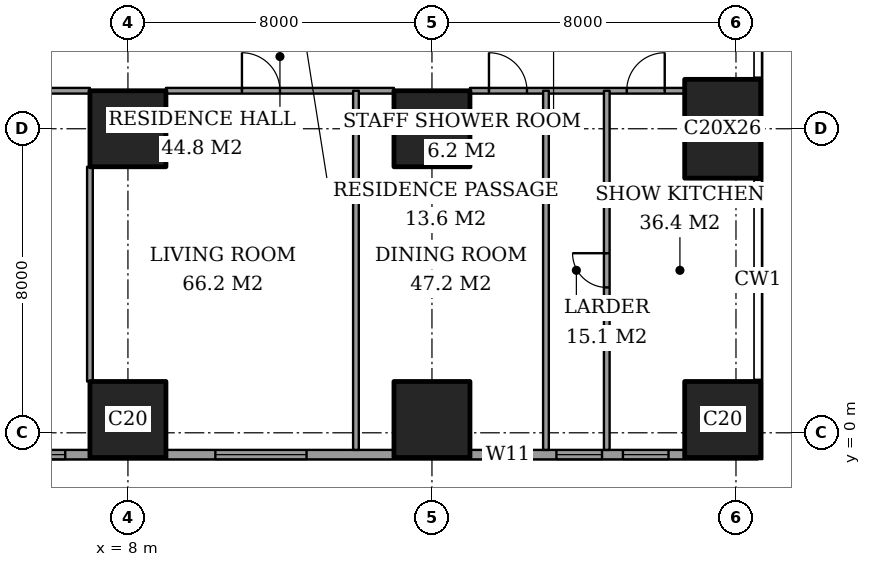
"""IFC4 building model, lengths in metres.
Left out: names, types, materials, properties, quantities, classifications, styles, units other than length and angle.
Written with IfcOpenShell. Run it as: python <this file> out.ifc"""

import sys

from ifc_helpers import new_model, si_unit, direction, frame, frame_2d, origin, origin_2d, place, context, subcontext, project, spatial, rectangle, extrude, element, fill, save


model = new_model("IFC4")
c1 = context("Model", 3, precision=1e-05, world=origin(), true_north=direction((0.0, 1.0)))
c2 = subcontext(c1, "Body", "Model", "MODEL_VIEW")
j1 = project(units=[si_unit("LENGTHUNIT", "METRE"), si_unit("PLANEANGLEUNIT", "RADIAN")], contexts=[c1])
p1 = place(None, origin())
s1 = spatial("IfcSite", under=j1, at=p1, CompositionType="ELEMENT")
p2 = place(p1, origin())
s2 = spatial("IfcBuilding", under=s1, at=p2, CompositionType="ELEMENT")
p3 = place(p2, frame((0.0, 0.0, 103.4)))
s3 = spatial("IfcBuildingStorey", under=s2, at=p3, CompositionType="ELEMENT", Elevation=103.4)
for number, where, z_axis, x_axis in (
    (1, (8.0, 0.35, 0.0), (0.0, 0.0, 1.0), (1.0, 0.0, 0.0)),
    (2, (8.0, 8.0, 0.0), (0.0, 0.0, 1.0), (1.0, 0.0, 0.0)),
    (3, (16.0, 0.35, 0.0), (0.0, 0.0, 1.0), (1.0, 0.0, 0.0)),
    (4, (16.0, 8.0, 0.0), (0.0, 0.0, 1.0), (1.0, 0.0, 0.0)),
    (5, (23.65, 0.35, 0.0), (0.0, 0.0, 1.0), (1.0, 0.0, 0.0)),
):
    element("IfcColumn", number, at=place(p3, frame(where, z_axis=z_axis, x_axis=x_axis)), inside=s3, PredefinedType="COLUMN", context=c2, shape_type="SweptSolid", body=[
        extrude(rectangle(XDim=2.0, YDim=2.0, at=origin_2d()), origin(), (0.0, 0.0, 1.0), 3.6),
    ])
p4 = place(p3, frame((23.65, 8.0, 0.0), z_axis=(0.0, 0.0, 1.0), x_axis=(1.0, 0.0, 0.0)))
e6 = element("IfcColumn", 6, at=p4, inside=s3, PredefinedType="COLUMN", context=c2, shape_type="SweptSolid", body=[
    extrude(rectangle(XDim=2.0, YDim=2.6, at=origin_2d()), origin(), (0.0, 0.0, 1.0), 3.6),
])
p5 = place(p3, frame((3.175, -0.575, 0.0), z_axis=(0.0, 0.0, 1.0), x_axis=(1.0, 0.0, 0.0)))
e7 = element("IfcWall", 7, at=p5, inside=s3, PredefinedType="SOLIDWALL", context=c2, shape_type="SweptSolid", body=[
    extrude(rectangle(XDim=21.4, YDim=0.25, at=frame_2d((10.7, 0.0))), origin(), (0.0, 0.0, 1.0), 3.6),
])
p6 = place(p5, frame((0.775, 0.0, 0.4)))
e8 = element("IfcOpeningElement", 8, at=p6, cuts=e7, PredefinedType="OPENING", context=c2, shape_type="SweptSolid", body=[
    extrude(rectangle(XDim=2.4, YDim=2.2, at=frame_2d((1.2, 1.1))), frame((0.0, 0.135, 0.0), z_axis=(0.0, -1.0, 0.0), x_axis=(1.0, 0.0, 0.0)), (0.0, 0.0, 1.0), 0.27),
])
p7 = place(p5, frame((7.125, 0.0, 0.4)))
e9 = element("IfcOpeningElement", 9, at=p7, cuts=e7, PredefinedType="OPENING", context=c2, shape_type="SweptSolid", body=[
    extrude(rectangle(XDim=2.4, YDim=2.2, at=frame_2d((1.2, 1.1))), frame((0.0, 0.135, 0.0), z_axis=(0.0, -1.0, 0.0), x_axis=(1.0, 0.0, 0.0)), (0.0, 0.0, 1.0), 0.27),
])
p8 = place(p5, frame((14.225, 0.0, 0.4)))
e10 = element("IfcOpeningElement", 10, at=p8, cuts=e7, PredefinedType="OPENING", context=c2, shape_type="SweptSolid", body=[
    extrude(rectangle(XDim=1.2, YDim=2.2, at=frame_2d((0.6, 1.1))), frame((0.0, 0.135, 0.0), z_axis=(0.0, -1.0, 0.0), x_axis=(1.0, 0.0, 0.0)), (0.0, 0.0, 1.0), 0.27),
])
p9 = place(p5, frame((16.1, 0.0, 0.4)))
e11 = element("IfcOpeningElement", 11, at=p9, cuts=e7, PredefinedType="OPENING", context=c2, shape_type="SweptSolid", body=[
    extrude(rectangle(XDim=1.2, YDim=2.2, at=frame_2d((0.6, 1.1))), frame((0.0, 0.135, 0.0), z_axis=(0.0, -1.0, 0.0), x_axis=(1.0, 0.0, 0.0)), (0.0, 0.0, 1.0), 0.27),
])
p10 = place(p5, frame((17.85, 0.0, 0.4)))
e12 = element("IfcOpeningElement", 12, at=p10, cuts=e7, PredefinedType="OPENING", context=c2, shape_type="SweptSolid", body=[
    extrude(rectangle(XDim=1.2, YDim=2.2, at=frame_2d((0.6, 1.1))), frame((0.0, 0.135, 0.0), z_axis=(0.0, -1.0, 0.0), x_axis=(1.0, 0.0, 0.0)), (0.0, 0.0, 1.0), 0.27),
])
p11 = place(p3, frame((1.35, 9.0, 0.0), z_axis=(0.0, 0.0, 1.0), x_axis=(1.0, 0.0, 0.0)))
e13 = element("IfcWall", 13, at=p11, inside=s3, PredefinedType="PARTITIONING", context=c2, shape_type="SweptSolid", body=[
    extrude(rectangle(XDim=5.65, YDim=0.15, at=frame_2d((2.825, 0.0))), origin(), (0.0, 0.0, 1.0), 3.35),
])
p12 = place(p11, frame((2.325, 0.0, 0.0)))
e14 = element("IfcOpeningElement", 14, at=p12, cuts=e13, PredefinedType="OPENING", context=c2, shape_type="SweptSolid", body=[
    extrude(rectangle(XDim=1.0, YDim=2.1, at=frame_2d((0.5, 1.05))), frame((0.0, 0.085, 0.0), z_axis=(0.0, -1.0, 0.0), x_axis=(1.0, 0.0, 0.0)), (0.0, 0.0, 1.0), 0.17),
])
p13 = place(p3, frame((9.0, 9.0, 0.0), z_axis=(0.0, 0.0, 1.0), x_axis=(1.0, 0.0, 0.0)))
e15 = element("IfcWall", 15, at=p13, inside=s3, PredefinedType="PARTITIONING", context=c2, shape_type="SweptSolid", body=[
    extrude(rectangle(XDim=6.0, YDim=0.15, at=frame_2d((3.0, 0.0))), origin(), (0.0, 0.0, 1.0), 3.35),
])
p14 = place(p13, frame((2.0, 0.0, 0.0)))
e16 = element("IfcOpeningElement", 16, at=p14, cuts=e15, PredefinedType="OPENING", context=c2, shape_type="SweptSolid", body=[
    extrude(rectangle(XDim=1.0, YDim=2.1, at=frame_2d((0.5, 1.05))), frame((0.0, 0.085, 0.0), z_axis=(0.0, -1.0, 0.0), x_axis=(1.0, 0.0, 0.0)), (0.0, 0.0, 1.0), 0.17),
])
p15 = place(p3, frame((17.0, 9.0, 0.0), z_axis=(0.0, 0.0, 1.0), x_axis=(1.0, 0.0, 0.0)))
e17 = element("IfcWall", 17, at=p15, inside=s3, PredefinedType="PARTITIONING", context=c2, shape_type="SweptSolid", body=[
    extrude(rectangle(XDim=5.65, YDim=0.15, at=frame_2d((2.825, 0.0))), origin(), (0.0, 0.0, 1.0), 3.35),
])
p16 = place(p15, frame((0.5, 0.0, 0.0)))
e18 = element("IfcOpeningElement", 18, at=p16, cuts=e17, PredefinedType="OPENING", context=c2, shape_type="SweptSolid", body=[
    extrude(rectangle(XDim=1.0, YDim=2.1, at=frame_2d((0.5, 1.05))), frame((0.0, 0.085, 0.0), z_axis=(0.0, -1.0, 0.0), x_axis=(1.0, 0.0, 0.0)), (0.0, 0.0, 1.0), 0.17),
])
p17 = place(p15, frame((4.125, 0.0, 0.0)))
e19 = element("IfcOpeningElement", 19, at=p17, cuts=e17, PredefinedType="OPENING", context=c2, shape_type="SweptSolid", body=[
    extrude(rectangle(XDim=1.0, YDim=2.1, at=frame_2d((0.5, 1.05))), frame((0.0, 0.085, 0.0), z_axis=(0.0, -1.0, 0.0), x_axis=(1.0, 0.0, 0.0)), (0.0, 0.0, 1.0), 0.17),
])
p18 = place(p3, frame((7.0, 1.35, 0.0), z_axis=(0.0, 0.0, 1.0), x_axis=(0.0, 1.0, 0.0)))
e20 = element("IfcWall", 20, at=p18, inside=s3, PredefinedType="PARTITIONING", context=c2, shape_type="SweptSolid", body=[
    extrude(rectangle(XDim=5.65, YDim=0.15, at=frame_2d((2.825, 0.0))), origin(), (0.0, 0.0, 1.0), 3.35),
])
for number, where, z_axis, x_axis in (
    (21, (14.0, -0.45, 0.0), (0.0, 0.0, 1.0), (0.0, 1.0, 0.0)),
    (22, (19.0, -0.45, 0.0), (0.0, 0.0, 1.0), (0.0, 1.0, 0.0)),
):
    element("IfcWall", number, at=place(p3, frame(where, z_axis=z_axis, x_axis=x_axis)), inside=s3, PredefinedType="PARTITIONING", context=c2, shape_type="SweptSolid", body=[
        extrude(rectangle(XDim=9.45, YDim=0.15, at=frame_2d((4.725, 0.0))), origin(), (0.0, 0.0, 1.0), 3.35),
    ])
p19 = place(p3, frame((20.6, -0.45, 0.0), z_axis=(0.0, 0.0, 1.0), x_axis=(0.0, 1.0, 0.0)))
e23 = element("IfcWall", 23, at=p19, inside=s3, PredefinedType="PARTITIONING", context=c2, shape_type="SweptSolid", body=[
    extrude(rectangle(XDim=9.45, YDim=0.15, at=frame_2d((4.725, 0.0))), origin(), (0.0, 0.0, 1.0), 3.35),
])
p20 = place(p19, frame((4.275, 0.0, 0.0)))
e24 = element("IfcOpeningElement", 24, at=p20, cuts=e23, PredefinedType="OPENING", context=c2, shape_type="SweptSolid", body=[
    extrude(rectangle(XDim=0.9, YDim=2.1, at=frame_2d((0.45, 1.05))), frame((0.0, 0.085, 0.0), z_axis=(0.0, -1.0, 0.0), x_axis=(1.0, 0.0, 0.0)), (0.0, 0.0, 1.0), 0.17),
])
p21 = place(p6, origin())
e25 = element("IfcWindow", 25, at=p21, inside=s3, PartitioningType="SINGLE_PANEL", PredefinedType="WINDOW", context=c2, shape_type="SweptSolid", body=[
    extrude(rectangle(XDim=2.4, YDim=2.2, at=frame_2d((1.2, 1.1))), frame((0.0, 0.03, 0.0), z_axis=(0.0, -1.0, 0.0), x_axis=(1.0, 0.0, 0.0)), (0.0, 0.0, 1.0), 0.06),
])
fill(e8, e25)
p22 = place(p7, origin())
e26 = element("IfcWindow", 26, at=p22, inside=s3, PartitioningType="SINGLE_PANEL", PredefinedType="WINDOW", context=c2, shape_type="SweptSolid", body=[
    extrude(rectangle(XDim=2.4, YDim=2.2, at=frame_2d((1.2, 1.1))), frame((0.0, 0.03, 0.0), z_axis=(0.0, -1.0, 0.0), x_axis=(1.0, 0.0, 0.0)), (0.0, 0.0, 1.0), 0.06),
])
fill(e9, e26)
p23 = place(p8, origin())
e27 = element("IfcWindow", 27, at=p23, inside=s3, PartitioningType="SINGLE_PANEL", PredefinedType="WINDOW", context=c2, shape_type="SweptSolid", body=[
    extrude(rectangle(XDim=1.2, YDim=2.2, at=frame_2d((0.6, 1.1))), frame((0.0, 0.03, 0.0), z_axis=(0.0, -1.0, 0.0), x_axis=(1.0, 0.0, 0.0)), (0.0, 0.0, 1.0), 0.06),
])
fill(e10, e27)
p24 = place(p9, origin())
e28 = element("IfcWindow", 28, at=p24, inside=s3, PartitioningType="SINGLE_PANEL", PredefinedType="WINDOW", context=c2, shape_type="SweptSolid", body=[
    extrude(rectangle(XDim=1.2, YDim=2.2, at=frame_2d((0.6, 1.1))), frame((0.0, 0.03, 0.0), z_axis=(0.0, -1.0, 0.0), x_axis=(1.0, 0.0, 0.0)), (0.0, 0.0, 1.0), 0.06),
])
fill(e11, e28)
p25 = place(p10, origin())
e29 = element("IfcWindow", 29, at=p25, inside=s3, PartitioningType="SINGLE_PANEL", PredefinedType="WINDOW", context=c2, shape_type="SweptSolid", body=[
    extrude(rectangle(XDim=1.2, YDim=2.2, at=frame_2d((0.6, 1.1))), frame((0.0, 0.03, 0.0), z_axis=(0.0, -1.0, 0.0), x_axis=(1.0, 0.0, 0.0)), (0.0, 0.0, 1.0), 0.06),
])
fill(e12, e29)
p26 = place(p14, origin())
e30 = element("IfcDoor", 30, at=p26, inside=s3, OperationType="SINGLE_SWING_RIGHT", PredefinedType="DOOR", context=c2, shape_type="SweptSolid", body=[
    extrude(rectangle(XDim=1.0, YDim=2.1, at=frame_2d((0.5, 1.05))), frame((0.0, 0.025, 0.0), z_axis=(0.0, -1.0, 0.0), x_axis=(1.0, 0.0, 0.0)), (0.0, 0.0, 1.0), 0.05),
])
fill(e16, e30)
p27 = place(p16, origin())
e31 = element("IfcDoor", 31, at=p27, inside=s3, OperationType="SINGLE_SWING_RIGHT", PredefinedType="DOOR", context=c2, shape_type="SweptSolid", body=[
    extrude(rectangle(XDim=1.0, YDim=2.1, at=frame_2d((0.5, 1.05))), frame((0.0, 0.025, 0.0), z_axis=(0.0, -1.0, 0.0), x_axis=(1.0, 0.0, 0.0)), (0.0, 0.0, 1.0), 0.05),
])
fill(e18, e31)
p28 = place(p20, origin())
e32 = element("IfcDoor", 32, at=p28, inside=s3, OperationType="SINGLE_SWING_LEFT", PredefinedType="DOOR", context=c2, shape_type="SweptSolid", body=[
    extrude(rectangle(XDim=0.9, YDim=2.1, at=frame_2d((0.45, 1.05))), frame((0.0, 0.025, 0.0), z_axis=(0.0, -1.0, 0.0), x_axis=(1.0, 0.0, 0.0)), (0.0, 0.0, 1.0), 0.05),
])
fill(e24, e32)
p29 = place(p17, origin())
e33 = element("IfcDoor", 33, at=p29, inside=s3, OperationType="SINGLE_SWING_LEFT", PredefinedType="DOOR", context=c2, shape_type="SweptSolid", body=[
    extrude(rectangle(XDim=1.0, YDim=2.1, at=frame_2d((0.5, 1.05))), frame((0.0, 0.025, 0.0), z_axis=(0.0, -1.0, 0.0), x_axis=(1.0, 0.0, 0.0)), (0.0, 0.0, 1.0), 0.05),
])
fill(e19, e33)
save(model, sys.argv[1])
